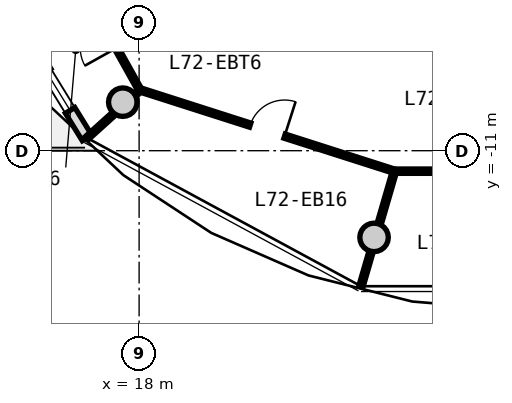
"""IFC4 building model, lengths in metres.
Left out: names, types, materials, properties, quantities, classifications, styles, units other than length and angle.
Written with IfcOpenShell. Run it as: python <this file> out.ifc"""

import sys

from ifc_helpers import new_model, si_unit, direction, frame, frame_2d, origin, origin_2d, place, context, subcontext, project, spatial, rectangle, circle, extrude, source, transform, mapped, element, fill, save


model = new_model("IFC4")
c1 = context("Model", 3, precision=1e-05, world=origin(), true_north=direction((0.0, 1.0)))
c2 = subcontext(c1, "Body", "Model", "MODEL_VIEW")
j1 = project(units=[si_unit("LENGTHUNIT", "METRE"), si_unit("PLANEANGLEUNIT", "RADIAN")], contexts=[c1])
p1 = place(None, origin())
s1 = spatial("IfcSite", under=j1, at=p1, CompositionType="ELEMENT")
p2 = place(p1, origin())
s2 = spatial("IfcBuilding", under=s1, at=p2, CompositionType="ELEMENT")
p3 = place(p2, frame((0.0, 0.0, 232.2)))
s3 = spatial("IfcBuildingStorey", under=s2, at=p3, CompositionType="ELEMENT", Elevation=232.2)
m1 = source(origin(), c2, "Body", "SweptSolid", [
    extrude(circle(Radius=0.375, at=origin_2d()), origin(), (0.0, 0.0, 1.0), 3.05),
])
for number, where, z_axis, x_axis in (
    (1, (17.57, -9.723, 0.0), (0.0, 0.0, 1.0), (1.0, 0.0, 0.0)),
    (2, (24.182, -13.281, 0.0), (0.0, 0.0, 1.0), (1.0, 0.0, 0.0)),
):
    element("IfcColumn", number, at=place(p3, frame(where, z_axis=z_axis, x_axis=x_axis)), inside=s3, PredefinedType="COLUMN", context=c2, shape_type="MappedRepresentation", body=[
        mapped(m1, transform((0.0, 0.0, 0.0), x_axis=(1.0, 0.0, 0.0), y_axis=(0.0, 1.0, 0.0), z_axis=(0.0, 0.0, 1.0), scale=1.0)),
    ])
m2 = source(origin(), c2, "Body", "SweptSolid", [
    extrude(rectangle(XDim=7.938, YDim=0.29, at=frame_2d((3.969, 0.0))), origin(), (0.0, 0.0, 1.0), 2.81),
])
p4 = place(p3, frame((16.63, -10.663, 0.0), z_axis=(0.0, 0.0, 1.0), x_axis=(-0.524244987663, 0.851567491694, 0.0)))
e3 = element("IfcWall", 3, at=p4, inside=s3, PredefinedType="SOLIDWALL", context=c2, shape_type="MappedRepresentation", body=[
    mapped(m2, transform((0.0, 0.0, 0.0), x_axis=(1.0, 0.0, 0.0), y_axis=(0.0, 1.0, 0.0), z_axis=(0.0, 0.0, 1.0), scale=1.0)),
])
p5 = place(p4, frame((5.86, 0.0, 0.0)))
e4 = element("IfcOpeningElement", 4, at=p5, cuts=e3, PredefinedType="OPENING", context=c2, shape_type="SweptSolid", body=[
    extrude(rectangle(XDim=1.15, YDim=2.25, at=frame_2d((0.575, 1.125))), frame((0.0, 0.155, 0.0), z_axis=(0.0, -1.0, 0.0), x_axis=(1.0, 0.0, 0.0)), (0.0, 0.0, 1.0), 0.31),
])
p6 = place(p4, frame((0.85, 0.0, 0.85)))
e5 = element("IfcOpeningElement", 5, at=p6, cuts=e3, PredefinedType="OPENING", context=c2, shape_type="SweptSolid", body=[
    extrude(rectangle(XDim=1.2, YDim=1.5, at=frame_2d((0.6, 0.75))), frame((0.0, 0.155, 0.0), z_axis=(0.0, -1.0, 0.0), x_axis=(1.0, 0.0, 0.0)), (0.0, 0.0, 1.0), 0.31),
])
m3 = source(origin(), c2, "Body", "SweptSolid", [
    extrude(rectangle(XDim=7.024, YDim=0.115, at=frame_2d((3.512, 0.0))), origin(), (0.0, 0.0, 1.0), 2.795),
])
p7 = place(p3, frame((18.03, -9.401, 0.0), z_axis=(0.0, 0.0, 1.0), x_axis=(0.952454006655, -0.304682400552, 0.0)))
e6 = element("IfcWall", 6, at=p7, inside=s3, PredefinedType="PARTITIONING", context=c2, shape_type="MappedRepresentation", body=[
    mapped(m3, transform((0.0, 0.0, 0.0), x_axis=(1.0, 0.0, 0.0), y_axis=(0.0, 1.0, 0.0), z_axis=(0.0, 0.0, 1.0), scale=1.0)),
])
p8 = place(p7, frame((3.037, 0.0, 0.0)))
e7 = element("IfcOpeningElement", 7, at=p8, cuts=e6, PredefinedType="OPENING", context=c2, shape_type="SweptSolid", body=[
    extrude(rectangle(XDim=0.95, YDim=2.1, at=frame_2d((0.475, 1.05))), frame((0.0, 0.067, 0.0), z_axis=(0.0, -1.0, 0.0), x_axis=(1.0, 0.0, 0.0)), (0.0, 0.0, 1.0), 0.135),
])
m4 = source(origin(), c2, "Body", "SweptSolid", [
    extrude(rectangle(XDim=1.905, YDim=0.115, at=frame_2d((0.953, 0.0))), origin(), (0.0, 0.0, 1.0), 2.395),
])
p9 = place(p3, frame((18.03, -9.401, 0.0), z_axis=(0.0, 0.0, 1.0), x_axis=(-0.742624708137, -0.669707804094, 0.0)))
e8 = element("IfcWall", 8, at=p9, inside=s3, PredefinedType="PARTITIONING", context=c2, shape_type="MappedRepresentation", body=[
    mapped(m4, transform((0.0, 0.0, 0.0), x_axis=(1.0, 0.0, 0.0), y_axis=(0.0, 1.0, 0.0), z_axis=(0.0, 0.0, 1.0), scale=1.0)),
])
m5 = source(origin(), c2, "Body", "SweptSolid", [
    extrude(rectangle(XDim=6.558, YDim=0.115, at=frame_2d((3.279, 0.0))), origin(), (0.0, 0.0, 1.0), 2.795),
])
p10 = place(p3, frame((24.721, -11.539, 0.0), z_axis=(0.0, 0.0, 1.0), x_axis=(1.0, 0.0, 0.0)))
e9 = element("IfcWall", 9, at=p10, inside=s3, PredefinedType="PARTITIONING", context=c2, shape_type="MappedRepresentation", body=[
    mapped(m5, transform((0.0, 0.0, 0.0), x_axis=(1.0, 0.0, 0.0), y_axis=(0.0, 1.0, 0.0), z_axis=(0.0, 0.0, 1.0), scale=1.0)),
])
p11 = place(p10, frame((2.804, 0.0, 0.0)))
e10 = element("IfcOpeningElement", 10, at=p11, cuts=e9, PredefinedType="OPENING", context=c2, shape_type="SweptSolid", body=[
    extrude(rectangle(XDim=0.95, YDim=2.1, at=frame_2d((0.475, 1.05))), frame((0.0, 0.067, 0.0), z_axis=(0.0, -1.0, 0.0), x_axis=(1.0, 0.0, 0.0)), (0.0, 0.0, 1.0), 0.135),
])
m6 = source(origin(), c2, "Body", "SweptSolid", [
    extrude(rectangle(XDim=3.173, YDim=0.115, at=frame_2d((1.587, 0.0))), origin(), (0.0, 0.0, 1.0), 2.395),
])
p12 = place(p3, frame((24.721, -11.539, 0.0), z_axis=(0.0, 0.0, 1.0), x_axis=(-0.279878875918, -0.960035319566, 0.0)))
e11 = element("IfcWall", 11, at=p12, inside=s3, PredefinedType="PARTITIONING", context=c2, shape_type="MappedRepresentation", body=[
    mapped(m6, transform((0.0, 0.0, 0.0), x_axis=(1.0, 0.0, 0.0), y_axis=(0.0, 1.0, 0.0), z_axis=(0.0, 0.0, 1.0), scale=1.0)),
])
m7 = source(origin(), c2, "Body", "SweptSolid", [
    extrude(rectangle(XDim=3.493, YDim=0.115, at=frame_2d((1.746, 0.0))), origin(), (0.0, 0.0, 1.0), 2.795),
])
p13 = place(p3, frame((16.318, -6.36, 0.0), z_axis=(0.0, 0.0, 1.0), x_axis=(0.487896553961, -0.872901456427, 0.0)))
e12 = element("IfcWall", 12, at=p13, inside=s3, PredefinedType="PARTITIONING", context=c2, shape_type="MappedRepresentation", body=[
    mapped(m7, transform((0.0, 0.0, 0.0), x_axis=(1.0, 0.0, 0.0), y_axis=(0.0, 1.0, 0.0), z_axis=(0.0, 0.0, 1.0), scale=1.0)),
])
p14 = place(p13, frame((1.271, 0.0, 0.0)))
e13 = element("IfcOpeningElement", 13, at=p14, cuts=e12, PredefinedType="OPENING", context=c2, shape_type="SweptSolid", body=[
    extrude(rectangle(XDim=0.95, YDim=2.1, at=frame_2d((0.475, 1.05))), frame((0.0, 0.067, 0.0), z_axis=(0.0, -1.0, 0.0), x_axis=(1.0, 0.0, 0.0)), (0.0, 0.0, 1.0), 0.135),
])
m8 = source(origin(), c2, "Body", "SweptSolid", [
    extrude(rectangle(XDim=1.2, YDim=1.5, at=frame_2d((0.6, 0.75))), frame((0.0, 0.03, 0.0), z_axis=(0.0, -1.0, 0.0), x_axis=(1.0, 0.0, 0.0)), (0.0, 0.0, 1.0), 0.06),
])
p15 = place(p6, origin())
e14 = element("IfcWindow", 14, at=p15, inside=s3, PartitioningType="SINGLE_PANEL", PredefinedType="WINDOW", context=c2, shape_type="MappedRepresentation", body=[
    mapped(m8, transform((0.0, 0.0, 0.0), x_axis=(1.0, 0.0, 0.0), y_axis=(0.0, 1.0, 0.0), z_axis=(0.0, 0.0, 1.0), scale=1.0)),
])
fill(e5, e14)
m9 = source(origin(), c2, "Body", "SweptSolid", [
    extrude(rectangle(XDim=0.95, YDim=2.1, at=frame_2d((0.475, 1.05))), frame((0.0, 0.025, 0.0), z_axis=(0.0, -1.0, 0.0), x_axis=(1.0, 0.0, 0.0)), (0.0, 0.0, 1.0), 0.05),
])
p16 = place(p8, origin())
e15 = element("IfcDoor", 15, at=p16, inside=s3, OperationType="SINGLE_SWING_RIGHT", PredefinedType="DOOR", context=c2, shape_type="MappedRepresentation", body=[
    mapped(m9, transform((0.0, 0.0, 0.0), x_axis=(1.0, 0.0, 0.0), y_axis=(0.0, 1.0, 0.0), z_axis=(0.0, 0.0, 1.0), scale=1.0)),
])
fill(e7, e15)
save(model, sys.argv[1])
